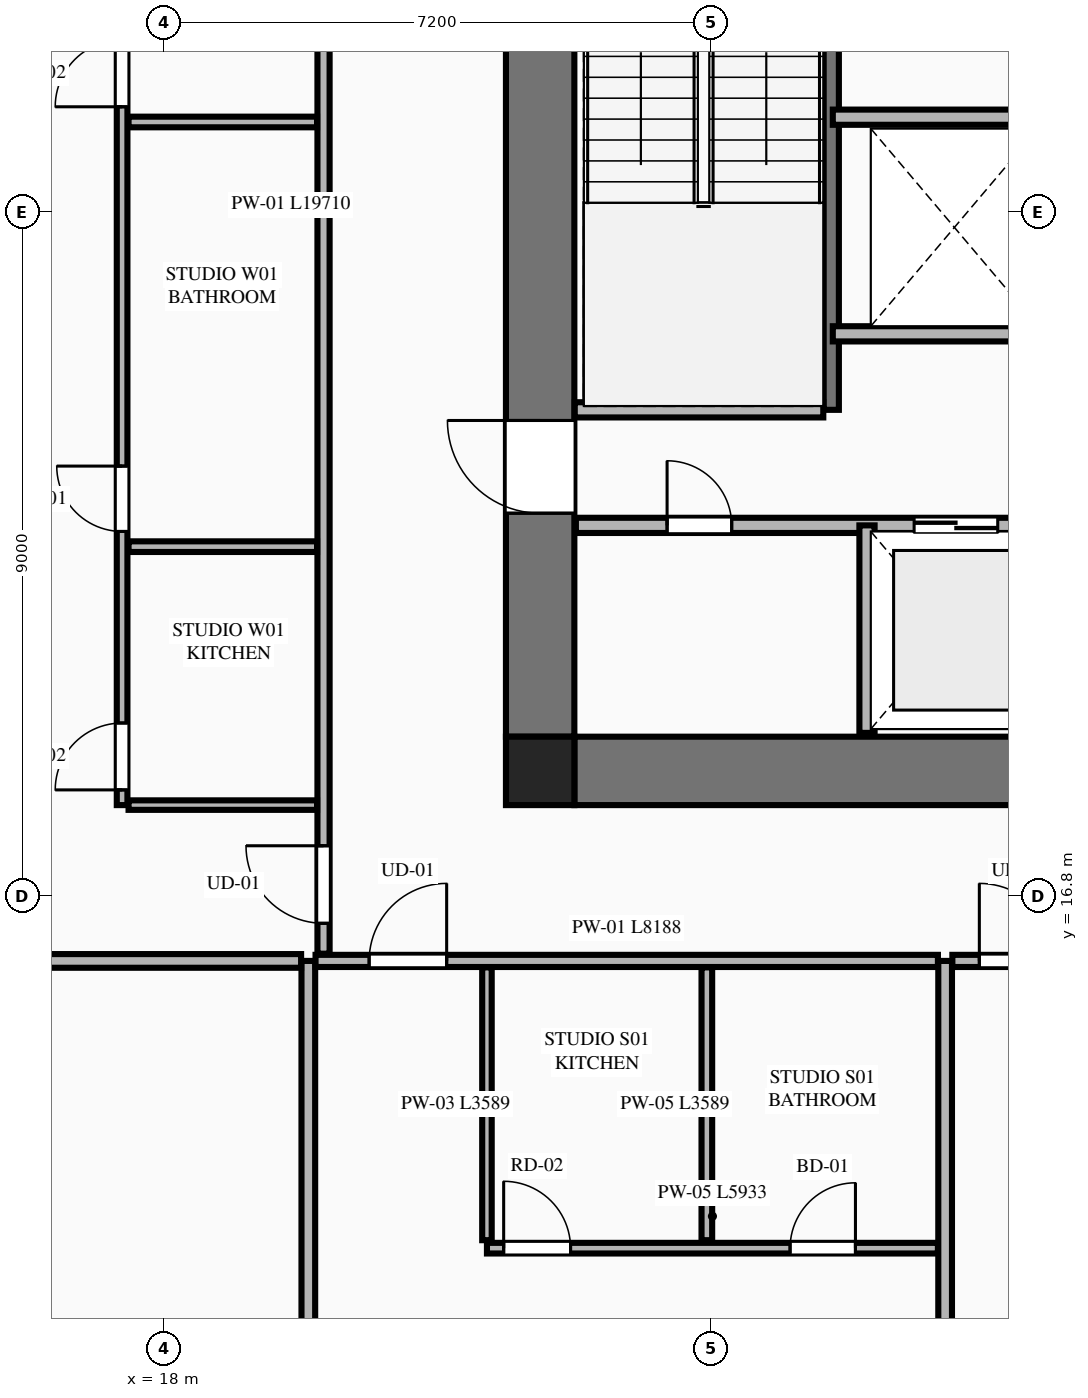
"""IFC4 building model, lengths in metres.
Left out: names, types, materials, properties, quantities, classifications, styles, units other than length and angle.
Written with IfcOpenShell. Run it as: python <this file> out.ifc"""

import sys

from ifc_helpers import new_model, si_unit, direction, frame, frame_2d, origin, origin_2d, place, context, subcontext, project, spatial, rectangle, extrude, element, fill, save


model = new_model("IFC4")
c1 = context("Model", 3, precision=1e-05, world=origin(), true_north=direction((0.0, 1.0)))
c2 = subcontext(c1, "Body", "Model", "MODEL_VIEW")
j1 = project(units=[si_unit("LENGTHUNIT", "METRE"), si_unit("PLANEANGLEUNIT", "RADIAN")], contexts=[c1])
p1 = place(None, origin())
s1 = spatial("IfcSite", under=j1, at=p1, CompositionType="ELEMENT")
p2 = place(p1, origin())
s2 = spatial("IfcBuilding", under=s1, at=p2, CompositionType="ELEMENT")
p3 = place(p2, frame((0.0, 0.0, 60.4)))
s3 = spatial("IfcBuildingStorey", under=s2, at=p3, CompositionType="ELEMENT", Elevation=60.4)
p4 = place(p3, frame((22.95, 18.45, 0.0), z_axis=(0.0, 0.0, 1.0), x_axis=(1.0, 0.0, 0.0)))
e1 = element("IfcColumn", 1, at=p4, inside=s3, PredefinedType="COLUMN", context=c2, shape_type="SweptSolid", body=[
    extrude(rectangle(XDim=0.9, YDim=0.9, at=origin_2d()), origin(), (0.0, 0.0, 1.0), 3.55),
])
p5 = place(p3, frame((23.4, 18.45, 0.0), z_axis=(0.0, 0.0, 1.0), x_axis=(1.0, 0.0, 0.0)))
e2 = element("IfcWall", 2, at=p5, inside=s3, PredefinedType="SHEAR", context=c2, shape_type="SweptSolid", body=[
    extrude(rectangle(XDim=18.0, YDim=0.9, at=frame_2d((9.0, 0.0))), origin(), (0.0, 0.0, 1.0), 3.33),
])
p6 = place(p3, frame((22.95, 18.9, 0.0), z_axis=(0.0, 0.0, 1.0), x_axis=(0.0, 1.0, 0.0)))
e3 = element("IfcWall", 3, at=p6, inside=s3, PredefinedType="SHEAR", context=c2, shape_type="SweptSolid", body=[
    extrude(rectangle(XDim=14.0, YDim=0.9, at=frame_2d((7.0, 0.0))), origin(), (0.0, 0.0, 1.0), 3.33),
])
p7 = place(p6, frame((2.94, 0.0, 0.0)))
e4 = element("IfcOpeningElement", 4, at=p7, cuts=e3, PredefinedType="OPENING", context=c2, shape_type="SweptSolid", body=[
    extrude(rectangle(XDim=1.22, YDim=2.25, at=frame_2d((0.61, 1.125))), frame((0.0, 0.46, 0.0), z_axis=(0.0, -1.0, 0.0), x_axis=(1.0, 0.0, 0.0)), (0.0, 0.0, 1.0), 0.92),
])
p8 = place(p3, frame((26.78, 23.2, 0.0), z_axis=(0.0, 0.0, 1.0), x_axis=(0.0, 1.0, 0.0)))
e5 = element("IfcWall", 5, at=p8, inside=s3, PredefinedType="SHEAR", context=c2, shape_type="SweptSolid", body=[
    extrude(rectangle(XDim=6.78, YDim=0.2, at=frame_2d((3.39, 0.0))), origin(), (0.0, 0.0, 1.0), 3.55),
])
p9 = place(p8, frame((5.32, 0.0, 0.0)))
e6 = element("IfcOpeningElement", 6, at=p9, cuts=e5, PredefinedType="OPENING", context=c2, shape_type="SweptSolid", body=[
    extrude(rectangle(XDim=1.05, YDim=2.15, at=frame_2d((0.525, 1.075))), frame((0.0, 0.11, 0.0), z_axis=(0.0, -1.0, 0.0), x_axis=(1.0, 0.0, 0.0)), (0.0, 0.0, 1.0), 0.22),
])
p10 = place(p3, frame((23.405, 23.2, 0.0), z_axis=(0.0, 0.0, 1.0), x_axis=(1.0, 0.0, 0.0)))
e7 = element("IfcWall", 7, at=p10, inside=s3, PredefinedType="PLUMBINGWALL", context=c2, shape_type="SweptSolid", body=[
    extrude(rectangle(XDim=3.27, YDim=0.2, at=frame_2d((1.635, 0.0))), origin(), (0.0, 0.0, 1.0), 3.33),
])
for number, where, z_axis, x_axis in (
    (8, (26.8, 27.05, 0.0), (0.0, 0.0, 1.0), (1.0, 0.0, 0.0)),
    (9, (26.8, 24.2, 0.0), (0.0, 0.0, 1.0), (1.0, 0.0, 0.0)),
):
    element("IfcWall", number, at=place(p3, frame(where, z_axis=z_axis, x_axis=x_axis)), inside=s3, PredefinedType="PLUMBINGWALL", context=c2, shape_type="SweptSolid", body=[
        extrude(rectangle(XDim=3.2, YDim=0.2, at=frame_2d((1.6, 0.0))), origin(), (0.0, 0.0, 1.0), 3.33),
    ])
p11 = place(p3, frame((23.42, 21.68, 0.0), z_axis=(0.0, 0.0, 1.0), x_axis=(1.0, 0.0, 0.0)))
e10 = element("IfcWall", 10, at=p11, inside=s3, PredefinedType="PLUMBINGWALL", context=c2, shape_type="SweptSolid", body=[
    extrude(rectangle(XDim=17.96, YDim=0.2, at=frame_2d((8.98, 0.0))), origin(), (0.0, 0.0, 1.0), 3.33),
])
p12 = place(p11, frame((4.45, 0.0, 0.0)))
e11 = element("IfcOpeningElement", 11, at=p12, cuts=e10, PredefinedType="OPENING", context=c2, shape_type="SweptSolid", body=[
    extrude(rectangle(XDim=1.1, YDim=2.2, at=frame_2d((0.55, 1.1))), frame((0.0, 0.11, 0.0), z_axis=(0.0, -1.0, 0.0), x_axis=(1.0, 0.0, 0.0)), (0.0, 0.0, 1.0), 0.22),
])
p13 = place(p11, frame((6.85, 0.0, 0.0)))
e12 = element("IfcOpeningElement", 12, at=p13, cuts=e10, PredefinedType="OPENING", context=c2, shape_type="SweptSolid", body=[
    extrude(rectangle(XDim=1.1, YDim=2.2, at=frame_2d((0.55, 1.1))), frame((0.0, 0.11, 0.0), z_axis=(0.0, -1.0, 0.0), x_axis=(1.0, 0.0, 0.0)), (0.0, 0.0, 1.0), 0.22),
])
p14 = place(p11, frame((9.25, 0.0, 0.0)))
e13 = element("IfcOpeningElement", 13, at=p14, cuts=e10, PredefinedType="OPENING", context=c2, shape_type="SweptSolid", body=[
    extrude(rectangle(XDim=1.1, YDim=2.2, at=frame_2d((0.55, 1.1))), frame((0.0, 0.11, 0.0), z_axis=(0.0, -1.0, 0.0), x_axis=(1.0, 0.0, 0.0)), (0.0, 0.0, 1.0), 0.22),
])
p15 = place(p11, frame((1.2, 0.0, 0.0)))
e14 = element("IfcOpeningElement", 14, at=p15, cuts=e10, PredefinedType="OPENING", context=c2, shape_type="SweptSolid", body=[
    extrude(rectangle(XDim=0.85, YDim=2.05, at=frame_2d((0.425, 1.025))), frame((0.0, 0.11, 0.0), z_axis=(0.0, -1.0, 0.0), x_axis=(1.0, 0.0, 0.0)), (0.0, 0.0, 1.0), 0.22),
])
p16 = place(p11, frame((13.55, 0.0, 0.0)))
e15 = element("IfcOpeningElement", 15, at=p16, cuts=e10, PredefinedType="OPENING", context=c2, shape_type="SweptSolid", body=[
    extrude(rectangle(XDim=0.85, YDim=2.05, at=frame_2d((0.425, 1.025))), frame((0.0, 0.11, 0.0), z_axis=(0.0, -1.0, 0.0), x_axis=(1.0, 0.0, 0.0)), (0.0, 0.0, 1.0), 0.22),
])
p17 = place(p11, frame((15.85, 0.0, 0.0)))
e16 = element("IfcOpeningElement", 16, at=p17, cuts=e10, PredefinedType="OPENING", context=c2, shape_type="SweptSolid", body=[
    extrude(rectangle(XDim=0.85, YDim=2.05, at=frame_2d((0.425, 1.025))), frame((0.0, 0.11, 0.0), z_axis=(0.0, -1.0, 0.0), x_axis=(1.0, 0.0, 0.0)), (0.0, 0.0, 1.0), 0.22),
])
p18 = place(p3, frame((27.25, 18.95, 0.0), z_axis=(0.0, 0.0, 1.0), x_axis=(0.0, 1.0, 0.0)))
e17 = element("IfcWall", 17, at=p18, inside=s3, PredefinedType="PLUMBINGWALL", context=c2, shape_type="SweptSolid", body=[
    extrude(rectangle(XDim=2.73, YDim=0.2, at=frame_2d((1.365, 0.0))), origin(), (0.0, 0.0, 1.0), 3.33),
])
p19 = place(p3, frame((19.9, 2.455, 0.0), z_axis=(0.0, 0.0, 1.0), x_axis=(0.0, 1.0, 0.0)))
e18 = element("IfcWall", 18, at=p19, inside=s3, PredefinedType="PARTITIONING", context=c2, shape_type="SweptSolid", body=[
    extrude(rectangle(XDim=13.495, YDim=0.18, at=frame_2d((6.748, 0.0))), origin(), (0.0, 0.0, 1.0), 3.33),
])
p20 = place(p3, frame((28.278, 2.455, 0.0), z_axis=(0.0, 0.0, 1.0), x_axis=(0.0, 1.0, 0.0)))
e19 = element("IfcWall", 19, at=p20, inside=s3, PredefinedType="PARTITIONING", context=c2, shape_type="SweptSolid", body=[
    extrude(rectangle(XDim=13.495, YDim=0.18, at=frame_2d((6.748, 0.0))), origin(), (0.0, 0.0, 1.0), 2.636),
])
p21 = place(p3, frame((19.995, 15.95, 0.0), z_axis=(0.0, 0.0, 1.0), x_axis=(1.0, 0.0, 0.0)))
e20 = element("IfcWall", 20, at=p21, inside=s3, PredefinedType="PARTITIONING", context=c2, shape_type="SweptSolid", body=[
    extrude(rectangle(XDim=8.188, YDim=0.16, at=frame_2d((4.094, 0.0))), origin(), (0.0, 0.0, 1.0), 3.33),
])
p22 = place(p21, frame((0.705, 0.0, 0.0)))
e21 = element("IfcOpeningElement", 21, at=p22, cuts=e20, PredefinedType="OPENING", context=c2, shape_type="SweptSolid", body=[
    extrude(rectangle(XDim=1.02, YDim=2.25, at=frame_2d((0.51, 1.125))), frame((0.0, 0.09, 0.0), z_axis=(0.0, -1.0, 0.0), x_axis=(1.0, 0.0, 0.0)), (0.0, 0.0, 1.0), 0.18),
])
p23 = place(p3, frame((22.25, 12.276, 0.0), z_axis=(0.0, 0.0, 1.0), x_axis=(0.0, 1.0, 0.0)))
e22 = element("IfcWall", 22, at=p23, inside=s3, PredefinedType="PARTITIONING", context=c2, shape_type="SweptSolid", body=[
    extrude(rectangle(XDim=3.589, YDim=0.125, at=frame_2d((1.794, 0.0))), origin(), (0.0, 0.0, 1.0), 2.636),
])
p24 = place(p3, frame((22.25, 12.171, 0.0), z_axis=(0.0, 0.0, 1.0), x_axis=(1.0, 0.0, 0.0)))
e23 = element("IfcWall", 23, at=p24, inside=s3, PredefinedType="PLUMBINGWALL", context=c2, shape_type="SweptSolid", body=[
    extrude(rectangle(XDim=5.933, YDim=0.14, at=frame_2d((2.967, 0.0))), origin(), (0.0, 0.0, 1.0), 3.33),
])
p25 = place(p24, frame((3.988, 0.0, 0.0)))
e24 = element("IfcOpeningElement", 24, at=p25, cuts=e23, PredefinedType="OPENING", context=c2, shape_type="SweptSolid", body=[
    extrude(rectangle(XDim=0.86, YDim=2.1, at=frame_2d((0.43, 1.05))), frame((0.0, 0.08, 0.0), z_axis=(0.0, -1.0, 0.0), x_axis=(1.0, 0.0, 0.0)), (0.0, 0.0, 1.0), 0.16),
])
p26 = place(p24, frame((0.22, 0.0, 0.0)))
e25 = element("IfcOpeningElement", 25, at=p26, cuts=e23, PredefinedType="OPENING", context=c2, shape_type="SweptSolid", body=[
    extrude(rectangle(XDim=0.88, YDim=2.15, at=frame_2d((0.44, 1.075))), frame((0.0, 0.08, 0.0), z_axis=(0.0, -1.0, 0.0), x_axis=(1.0, 0.0, 0.0)), (0.0, 0.0, 1.0), 0.16),
])
p27 = place(p3, frame((25.143, 12.276, 0.0), z_axis=(0.0, 0.0, 1.0), x_axis=(0.0, 1.0, 0.0)))
e26 = element("IfcWall", 26, at=p27, inside=s3, PredefinedType="PLUMBINGWALL", context=c2, shape_type="SweptSolid", body=[
    extrude(rectangle(XDim=3.589, YDim=0.14, at=frame_2d((1.794, 0.0))), origin(), (0.0, 0.0, 1.0), 3.33),
])
p28 = place(p3, frame((28.373, 15.95, 0.0), z_axis=(0.0, 0.0, 1.0), x_axis=(1.0, 0.0, 0.0)))
e27 = element("IfcWall", 27, at=p28, inside=s3, PredefinedType="PARTITIONING", context=c2, shape_type="SweptSolid", body=[
    extrude(rectangle(XDim=8.054, YDim=0.16, at=frame_2d((4.027, 0.0))), origin(), (0.0, 0.0, 1.0), 3.33),
])
p29 = place(p28, frame((0.355, 0.0, 0.0)))
e28 = element("IfcOpeningElement", 28, at=p29, cuts=e27, PredefinedType="OPENING", context=c2, shape_type="SweptSolid", body=[
    extrude(rectangle(XDim=1.02, YDim=2.25, at=frame_2d((0.51, 1.125))), frame((0.0, 0.09, 0.0), z_axis=(0.0, -1.0, 0.0), x_axis=(1.0, 0.0, 0.0)), (0.0, 0.0, 1.0), 0.18),
])
p30 = place(p3, frame((10.564, 15.95, 0.0), z_axis=(0.0, 0.0, 1.0), x_axis=(1.0, 0.0, 0.0)))
e29 = element("IfcWall", 29, at=p30, inside=s3, PredefinedType="PARTITIONING", context=c2, shape_type="SweptSolid", body=[
    extrude(rectangle(XDim=9.241, YDim=0.18, at=frame_2d((4.621, 0.0))), origin(), (0.0, 0.0, 1.0), 3.33),
])
p31 = place(p3, frame((20.1, 16.045, 0.0), z_axis=(0.0, 0.0, 1.0), x_axis=(0.0, 1.0, 0.0)))
e30 = element("IfcWall", 30, at=p31, inside=s3, PredefinedType="PARTITIONING", context=c2, shape_type="SweptSolid", body=[
    extrude(rectangle(XDim=19.71, YDim=0.16, at=frame_2d((9.855, 0.0))), origin(), (0.0, 0.0, 1.0), 3.33),
])
p32 = place(p31, frame((0.4, 0.0, 0.0)))
e31 = element("IfcOpeningElement", 31, at=p32, cuts=e30, PredefinedType="OPENING", context=c2, shape_type="SweptSolid", body=[
    extrude(rectangle(XDim=1.02, YDim=2.25, at=frame_2d((0.51, 1.125))), frame((0.0, 0.09, 0.0), z_axis=(0.0, -1.0, 0.0), x_axis=(1.0, 0.0, 0.0)), (0.0, 0.0, 1.0), 0.18),
])
p33 = place(p3, frame((17.535, 18.0, 0.0), z_axis=(0.0, 0.0, 1.0), x_axis=(1.0, 0.0, 0.0)))
e32 = element("IfcWall", 32, at=p33, inside=s3, PredefinedType="PARTITIONING", context=c2, shape_type="SweptSolid", body=[
    extrude(rectangle(XDim=2.48, YDim=0.125, at=frame_2d((1.24, 0.0))), origin(), (0.0, 0.0, 1.0), 2.636),
])
p34 = place(p3, frame((17.45, 18.0, 0.0), z_axis=(0.0, 0.0, 1.0), x_axis=(0.0, 1.0, 0.0)))
e33 = element("IfcWall", 33, at=p34, inside=s3, PredefinedType="PLUMBINGWALL", context=c2, shape_type="SweptSolid", body=[
    extrude(rectangle(XDim=17.755, YDim=0.14, at=frame_2d((8.877, 0.0))), origin(), (0.0, 0.0, 1.0), 3.33),
])
p35 = place(p34, frame((3.6, 0.0, 0.0)))
e34 = element("IfcOpeningElement", 34, at=p35, cuts=e33, PredefinedType="OPENING", context=c2, shape_type="SweptSolid", body=[
    extrude(rectangle(XDim=0.86, YDim=2.1, at=frame_2d((0.43, 1.05))), frame((0.0, 0.08, 0.0), z_axis=(0.0, -1.0, 0.0), x_axis=(1.0, 0.0, 0.0)), (0.0, 0.0, 1.0), 0.16),
])
p36 = place(p34, frame((9.187, 0.0, 0.0)))
e35 = element("IfcOpeningElement", 35, at=p36, cuts=e33, PredefinedType="OPENING", context=c2, shape_type="SweptSolid", body=[
    extrude(rectangle(XDim=0.88, YDim=2.15, at=frame_2d((0.44, 1.075))), frame((0.0, 0.08, 0.0), z_axis=(0.0, -1.0, 0.0), x_axis=(1.0, 0.0, 0.0)), (0.0, 0.0, 1.0), 0.16),
])
p37 = place(p34, frame((0.2, 0.0, 0.0)))
e36 = element("IfcOpeningElement", 36, at=p37, cuts=e33, PredefinedType="OPENING", context=c2, shape_type="SweptSolid", body=[
    extrude(rectangle(XDim=0.88, YDim=2.15, at=frame_2d((0.44, 1.075))), frame((0.0, 0.08, 0.0), z_axis=(0.0, -1.0, 0.0), x_axis=(1.0, 0.0, 0.0)), (0.0, 0.0, 1.0), 0.16),
])
for number, where, z_axis, x_axis in (
    (37, (17.535, 21.4, 0.0), (0.0, 0.0, 1.0), (1.0, 0.0, 0.0)),
    (38, (17.535, 26.987, 0.0), (0.0, 0.0, 1.0), (1.0, 0.0, 0.0)),
):
    element("IfcWall", number, at=place(p3, frame(where, z_axis=z_axis, x_axis=x_axis)), inside=s3, PredefinedType="PLUMBINGWALL", context=c2, shape_type="SweptSolid", body=[
        extrude(rectangle(XDim=2.48, YDim=0.14, at=frame_2d((1.24, 0.0))), origin(), (0.0, 0.0, 1.0), 3.33),
    ])
p38 = place(p7, origin())
e39 = element("IfcDoor", 39, at=p38, inside=s3, OperationType="SINGLE_SWING_RIGHT", PredefinedType="DOOR", context=c2, shape_type="SweptSolid", body=[
    extrude(rectangle(XDim=1.22, YDim=2.25, at=frame_2d((0.61, 1.125))), frame((0.0, 0.025, 0.0), z_axis=(0.0, -1.0, 0.0), x_axis=(1.0, 0.0, 0.0)), (0.0, 0.0, 1.0), 0.05),
])
fill(e4, e39)
p39 = place(p12, origin())
e40 = element("IfcDoor", 40, at=p39, inside=s3, OperationType="DOUBLE_DOOR_SLIDING", PredefinedType="DOOR", context=c2, shape_type="SweptSolid", body=[
    extrude(rectangle(XDim=1.1, YDim=2.2, at=frame_2d((0.55, 1.1))), frame((0.0, 0.025, 0.0), z_axis=(0.0, -1.0, 0.0), x_axis=(1.0, 0.0, 0.0)), (0.0, 0.0, 1.0), 0.05),
])
fill(e11, e40)
p40 = place(p15, origin())
e41 = element("IfcDoor", 41, at=p40, inside=s3, OperationType="SINGLE_SWING_LEFT", PredefinedType="DOOR", context=c2, shape_type="SweptSolid", body=[
    extrude(rectangle(XDim=0.85, YDim=2.05, at=frame_2d((0.425, 1.025))), frame((0.0, 0.025, 0.0), z_axis=(0.0, -1.0, 0.0), x_axis=(1.0, 0.0, 0.0)), (0.0, 0.0, 1.0), 0.05),
])
fill(e14, e41)
p41 = place(p25, origin())
e42 = element("IfcDoor", 42, at=p41, inside=s3, OperationType="SINGLE_SWING_RIGHT", PredefinedType="DOOR", context=c2, shape_type="SweptSolid", body=[
    extrude(rectangle(XDim=0.86, YDim=2.1, at=frame_2d((0.43, 1.05))), frame((0.0, 0.025, 0.0), z_axis=(0.0, -1.0, 0.0), x_axis=(1.0, 0.0, 0.0)), (0.0, 0.0, 1.0), 0.05),
])
fill(e24, e42)
p42 = place(p22, origin())
e43 = element("IfcDoor", 43, at=p42, inside=s3, OperationType="SINGLE_SWING_RIGHT", PredefinedType="DOOR", context=c2, shape_type="SweptSolid", body=[
    extrude(rectangle(XDim=1.02, YDim=2.25, at=frame_2d((0.51, 1.125))), frame((0.0, 0.025, 0.0), z_axis=(0.0, -1.0, 0.0), x_axis=(1.0, 0.0, 0.0)), (0.0, 0.0, 1.0), 0.05),
])
fill(e21, e43)
p43 = place(p26, origin())
e44 = element("IfcDoor", 44, at=p43, inside=s3, OperationType="SINGLE_SWING_LEFT", PredefinedType="DOOR", context=c2, shape_type="SweptSolid", body=[
    extrude(rectangle(XDim=0.88, YDim=2.15, at=frame_2d((0.44, 1.075))), frame((0.0, 0.025, 0.0), z_axis=(0.0, -1.0, 0.0), x_axis=(1.0, 0.0, 0.0)), (0.0, 0.0, 1.0), 0.05),
])
fill(e25, e44)
p44 = place(p29, origin())
e45 = element("IfcDoor", 45, at=p44, inside=s3, OperationType="SINGLE_SWING_LEFT", PredefinedType="DOOR", context=c2, shape_type="SweptSolid", body=[
    extrude(rectangle(XDim=1.02, YDim=2.25, at=frame_2d((0.51, 1.125))), frame((0.0, 0.025, 0.0), z_axis=(0.0, -1.0, 0.0), x_axis=(1.0, 0.0, 0.0)), (0.0, 0.0, 1.0), 0.05),
])
fill(e28, e45)
p45 = place(p35, origin())
e46 = element("IfcDoor", 46, at=p45, inside=s3, OperationType="SINGLE_SWING_RIGHT", PredefinedType="DOOR", context=c2, shape_type="SweptSolid", body=[
    extrude(rectangle(XDim=0.86, YDim=2.1, at=frame_2d((0.43, 1.05))), frame((0.0, 0.025, 0.0), z_axis=(0.0, -1.0, 0.0), x_axis=(1.0, 0.0, 0.0)), (0.0, 0.0, 1.0), 0.05),
])
fill(e34, e46)
p46 = place(p36, origin())
e47 = element("IfcDoor", 47, at=p46, inside=s3, OperationType="SINGLE_SWING_LEFT", PredefinedType="DOOR", context=c2, shape_type="SweptSolid", body=[
    extrude(rectangle(XDim=0.88, YDim=2.15, at=frame_2d((0.44, 1.075))), frame((0.0, 0.025, 0.0), z_axis=(0.0, -1.0, 0.0), x_axis=(1.0, 0.0, 0.0)), (0.0, 0.0, 1.0), 0.05),
])
fill(e35, e47)
p47 = place(p32, origin())
e48 = element("IfcDoor", 48, at=p47, inside=s3, OperationType="SINGLE_SWING_RIGHT", PredefinedType="DOOR", context=c2, shape_type="SweptSolid", body=[
    extrude(rectangle(XDim=1.02, YDim=2.25, at=frame_2d((0.51, 1.125))), frame((0.0, 0.025, 0.0), z_axis=(0.0, -1.0, 0.0), x_axis=(1.0, 0.0, 0.0)), (0.0, 0.0, 1.0), 0.05),
])
fill(e31, e48)
p48 = place(p37, origin())
e49 = element("IfcDoor", 49, at=p48, inside=s3, OperationType="SINGLE_SWING_LEFT", PredefinedType="DOOR", context=c2, shape_type="SweptSolid", body=[
    extrude(rectangle(XDim=0.88, YDim=2.15, at=frame_2d((0.44, 1.075))), frame((0.0, 0.025, 0.0), z_axis=(0.0, -1.0, 0.0), x_axis=(1.0, 0.0, 0.0)), (0.0, 0.0, 1.0), 0.05),
])
fill(e36, e49)
save(model, sys.argv[1])
